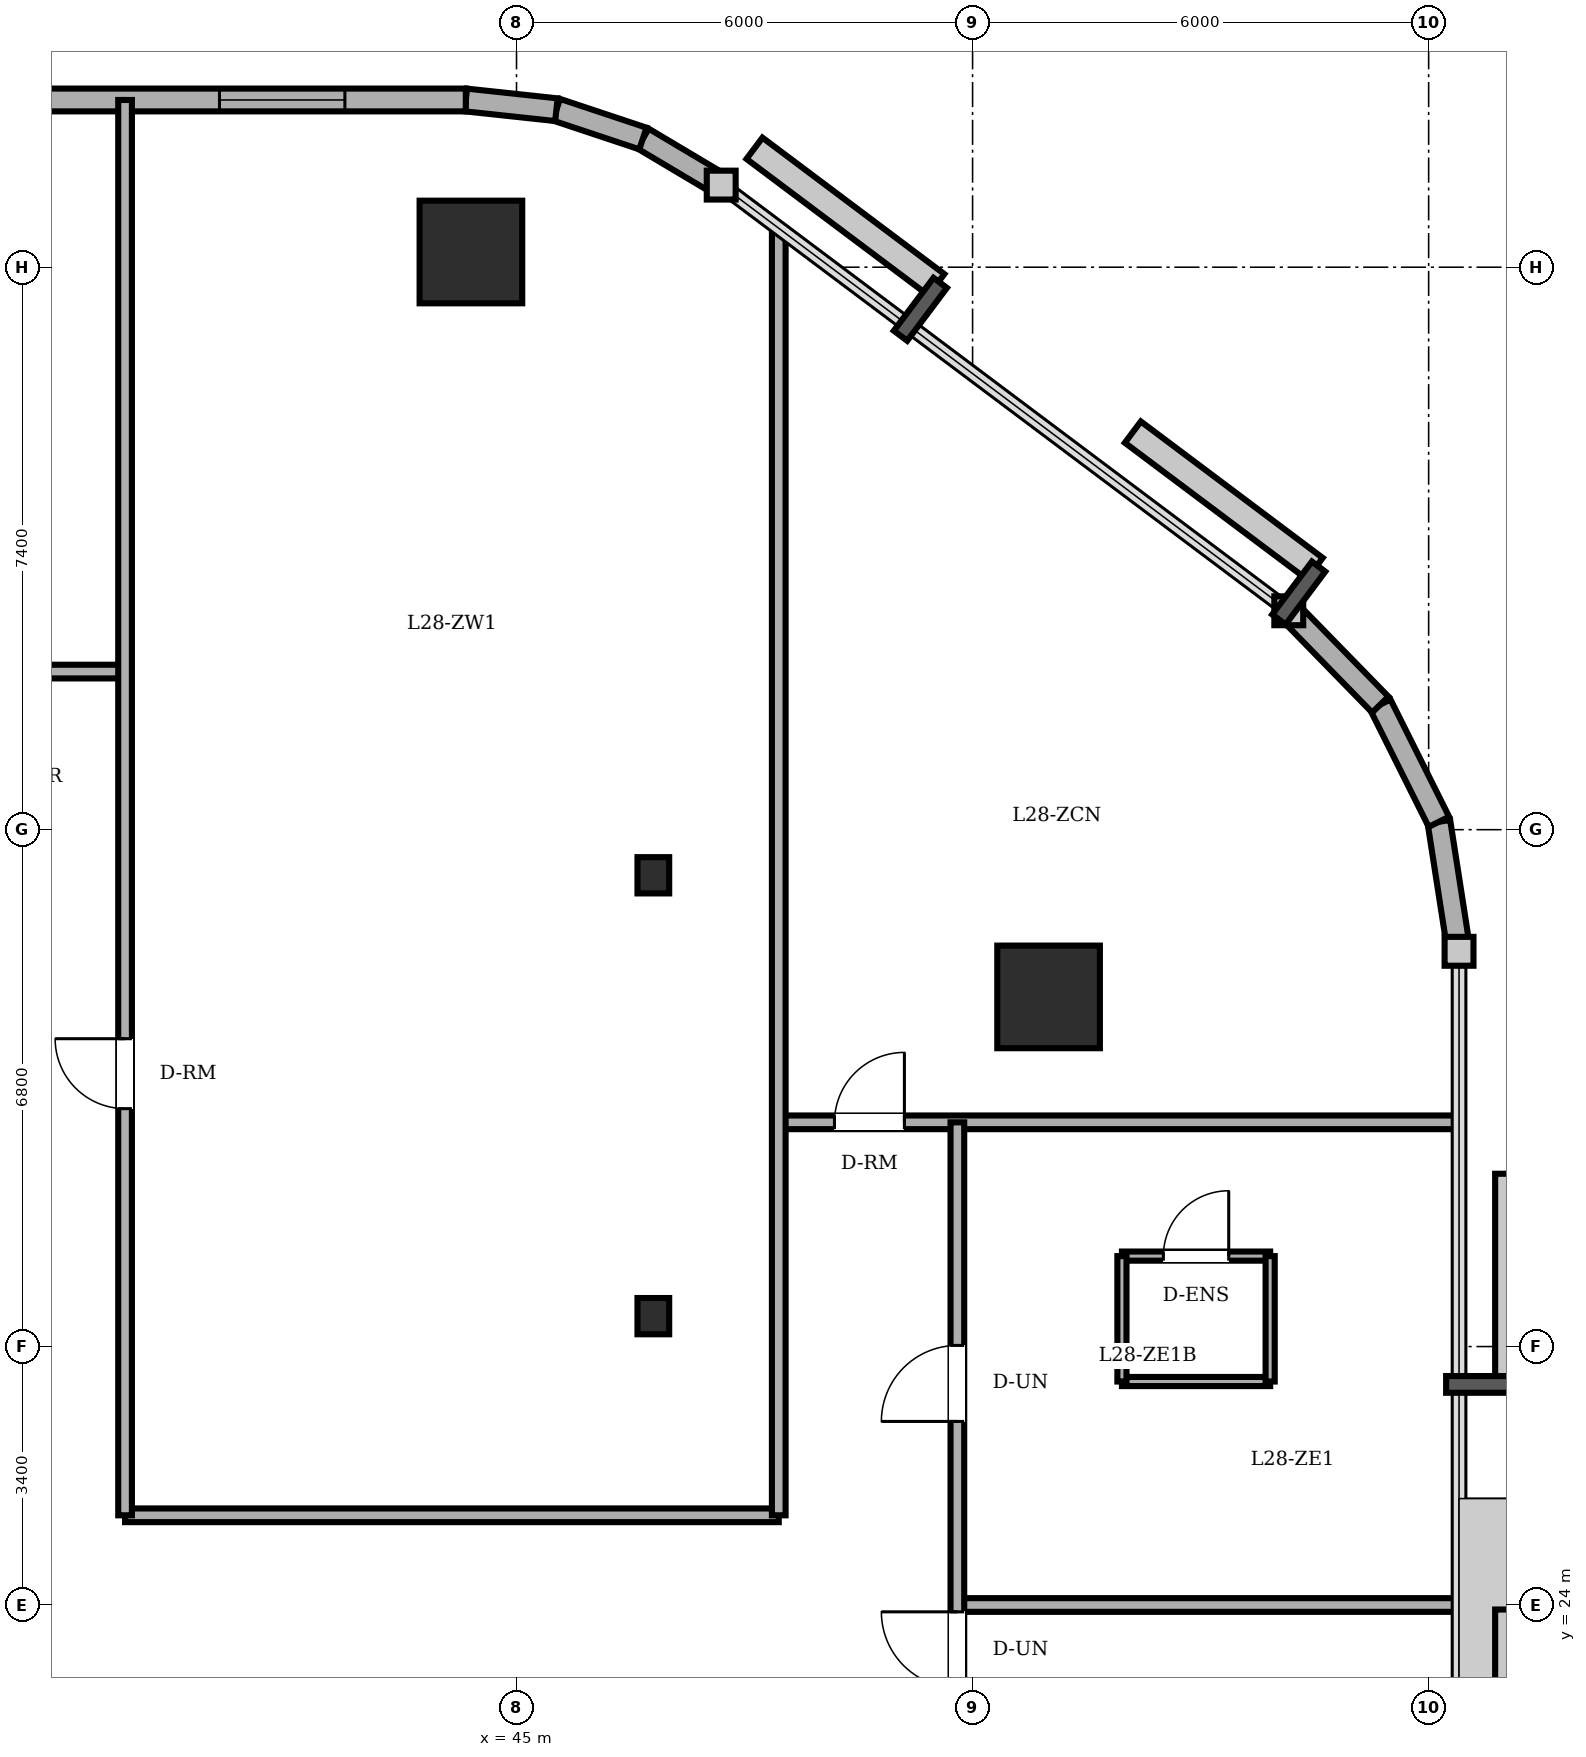
"""IFC4 building model, lengths in metres.
Left out: names, types, materials, properties, quantities, classifications, styles, units other than length and angle.
Written with IfcOpenShell. Run it as: python <this file> out.ifc"""

import sys

from ifc_helpers import new_model, si_unit, direction, frame, frame_2d, origin, origin_2d, place, context, subcontext, project, spatial, rectangle, circle, i_section, extrude, element, fill, save


model = new_model("IFC4")
c1 = context("Model", 3, precision=1e-05, world=origin(), true_north=direction((0.0, 1.0)))
c2 = subcontext(c1, "Body", "Model", "MODEL_VIEW")
j1 = project(units=[si_unit("LENGTHUNIT", "METRE"), si_unit("PLANEANGLEUNIT", "RADIAN")], contexts=[c1])
p1 = place(None, origin())
s1 = spatial("IfcSite", under=j1, at=p1, CompositionType="ELEMENT")
p2 = place(p1, origin())
s2 = spatial("IfcBuilding", under=s1, at=p2, CompositionType="ELEMENT")
p3 = place(p2, frame((0.0, 0.0, 107.9)))
s3 = spatial("IfcBuildingStorey", under=s2, at=p3, CompositionType="ELEMENT", Elevation=107.9)
for number, where, z_axis, x_axis in (
    (1, (52.0, 32.0, 0.0), (0.0, 0.0, 1.0), (1.0, 0.0, 0.0)),
    (2, (44.4, 41.8, 0.0), (0.0, 0.0, 1.0), (1.0, 0.0, 0.0)),
):
    element("IfcColumn", number, at=place(p3, frame(where, z_axis=z_axis, x_axis=x_axis)), inside=s3, PredefinedType="COLUMN", context=c2, shape_type="SweptSolid", body=[
        extrude(circle(Radius=0.675, at=origin_2d()), origin(), (0.0, 0.0, 1.0), 3.6),
    ])
for number, where, z_axis, x_axis in (
    (3, (46.8, 27.8, 0.0), (0.0, 0.0, 1.0), (1.0, 0.0, 0.0)),
    (4, (46.8, 33.6, 0.0), (0.0, 0.0, 1.0), (1.0, 0.0, 0.0)),
):
    element("IfcColumn", number, at=place(p3, frame(where, z_axis=z_axis, x_axis=x_axis)), inside=s3, PredefinedType="COLUMN", context=c2, shape_type="SweptSolid", body=[
        extrude(i_section(OverallWidth=0.417, OverallDepth=0.477, WebThickness=0.036, FlangeThickness=0.057, FilletRadius=0.015, at=origin_2d()), origin(), (0.0, 0.0, 1.0), 3.6),
    ])
p4 = place(p3, frame((57.4, 32.6, 0.0), z_axis=(0.0, 0.0, 1.0), x_axis=(-0.153620989032, 0.988129845581, 0.0)))
e5 = element("IfcWall", 5, at=p4, inside=s3, PredefinedType="SOLIDWALL", context=c2, shape_type="SweptSolid", body=[
    extrude(rectangle(XDim=1.724, YDim=0.3, at=frame_2d((0.862, 0.0))), origin(), (0.0, 0.0, 1.0), 3.4),
])
for number, where, z_axis, x_axis in (
    (6, (57.135, 34.304, 0.0), (0.0, 0.0, 1.0), (-0.447, 0.894, 0.0)),
    (7, (56.364, 35.846, 0.0), (0.0, 0.0, 1.0), (-0.698, 0.716, 0.0)),
):
    element("IfcWall", number, at=place(p3, frame(where, z_axis=z_axis, x_axis=x_axis)), inside=s3, PredefinedType="SOLIDWALL", context=c2, shape_type="SweptSolid", body=[
        extrude(rectangle(XDim=1.724, YDim=0.3, at=frame_2d((0.862, 0.0))), origin(), (0.0, 0.0, 1.0), 3.4),
    ])
p5 = place(p3, frame((47.693, 42.68, 0.0), z_axis=(0.0, 0.0, 1.0), x_axis=(-0.859320591642, 0.511437308749, 0.0)))
e8 = element("IfcWall", 8, at=p5, inside=s3, PredefinedType="SOLIDWALL", context=c2, shape_type="SweptSolid", body=[
    extrude(rectangle(XDim=1.199, YDim=0.3, at=frame_2d((0.599, 0.0))), origin(), (0.0, 0.0, 1.0), 3.4),
])
p6 = place(p3, frame((46.663, 43.293, 0.0), z_axis=(0.0, 0.0, 1.0), x_axis=(-0.948744332129, 0.316044604847, 0.0)))
e9 = element("IfcWall", 9, at=p6, inside=s3, PredefinedType="SOLIDWALL", context=c2, shape_type="SweptSolid", body=[
    extrude(rectangle(XDim=1.2, YDim=0.3, at=frame_2d((0.6, 0.0))), origin(), (0.0, 0.0, 1.0), 3.4),
])
p7 = place(p3, frame((45.525, 43.672, 0.0), z_axis=(0.0, 0.0, 1.0), x_axis=(-0.994289103787, 0.106720092254, 0.0)))
e10 = element("IfcWall", 10, at=p7, inside=s3, PredefinedType="SOLIDWALL", context=c2, shape_type="SweptSolid", body=[
    extrude(rectangle(XDim=1.199, YDim=0.3, at=frame_2d((0.599, 0.0))), origin(), (0.0, 0.0, 1.0), 3.4),
])
p8 = place(p3, frame((44.333, 43.8, 0.0), z_axis=(0.0, 0.0, 1.0), x_axis=(-1.0, 0.0, 0.0)))
e11 = element("IfcWall", 11, at=p8, inside=s3, PredefinedType="SOLIDWALL", context=c2, shape_type="SweptSolid", body=[
    extrude(rectangle(XDim=29.933, YDim=0.3, at=frame_2d((14.967, 0.0))), origin(), (0.0, 0.0, 1.0), 3.4),
])
p9 = place(p8, frame((19.808, 0.0, 0.0)))
e12 = element("IfcOpeningElement", 12, at=p9, cuts=e11, PredefinedType="OPENING", context=c2, shape_type="SweptSolid", body=[
    extrude(rectangle(XDim=0.95, YDim=2.2, at=frame_2d((0.475, 1.1))), frame((0.0, 0.16, 0.0), z_axis=(0.0, -1.0, 0.0), x_axis=(1.0, 0.0, 0.0)), (0.0, 0.0, 1.0), 0.32),
])
p10 = place(p8, frame((1.591, 0.0, 0.85)))
e13 = element("IfcOpeningElement", 13, at=p10, cuts=e11, PredefinedType="OPENING", context=c2, shape_type="SweptSolid", body=[
    extrude(rectangle(XDim=1.65, YDim=1.55, at=frame_2d((0.825, 0.775))), frame((0.0, 0.16, 0.0), z_axis=(0.0, -1.0, 0.0), x_axis=(1.0, 0.0, 0.0)), (0.0, 0.0, 1.0), 0.32),
])
p11 = place(p8, frame((6.808, 0.0, 0.85)))
e14 = element("IfcOpeningElement", 14, at=p11, cuts=e11, PredefinedType="OPENING", context=c2, shape_type="SweptSolid", body=[
    extrude(rectangle(XDim=1.65, YDim=1.55, at=frame_2d((0.825, 0.775))), frame((0.0, 0.16, 0.0), z_axis=(0.0, -1.0, 0.0), x_axis=(1.0, 0.0, 0.0)), (0.0, 0.0, 1.0), 0.32),
])
p12 = place(p8, frame((9.958, 0.0, 0.85)))
e15 = element("IfcOpeningElement", 15, at=p12, cuts=e11, PredefinedType="OPENING", context=c2, shape_type="SweptSolid", body=[
    extrude(rectangle(XDim=1.65, YDim=1.55, at=frame_2d((0.825, 0.775))), frame((0.0, 0.16, 0.0), z_axis=(0.0, -1.0, 0.0), x_axis=(1.0, 0.0, 0.0)), (0.0, 0.0, 1.0), 0.32),
])
p13 = place(p8, frame((15.508, 0.0, 0.85)))
e16 = element("IfcOpeningElement", 16, at=p13, cuts=e11, PredefinedType="OPENING", context=c2, shape_type="SweptSolid", body=[
    extrude(rectangle(XDim=1.65, YDim=1.55, at=frame_2d((0.825, 0.775))), frame((0.0, 0.16, 0.0), z_axis=(0.0, -1.0, 0.0), x_axis=(1.0, 0.0, 0.0)), (0.0, 0.0, 1.0), 0.32),
])
p14 = place(p8, frame((23.125, 0.0, 0.85)))
e17 = element("IfcOpeningElement", 17, at=p14, cuts=e11, PredefinedType="OPENING", context=c2, shape_type="SweptSolid", body=[
    extrude(rectangle(XDim=1.65, YDim=1.55, at=frame_2d((0.825, 0.775))), frame((0.0, 0.16, 0.0), z_axis=(0.0, -1.0, 0.0), x_axis=(1.0, 0.0, 0.0)), (0.0, 0.0, 1.0), 0.32),
])
p15 = place(p8, frame((25.941, 0.0, 0.85)))
e18 = element("IfcOpeningElement", 18, at=p15, cuts=e11, PredefinedType="OPENING", context=c2, shape_type="SweptSolid", body=[
    extrude(rectangle(XDim=1.65, YDim=1.55, at=frame_2d((0.825, 0.775))), frame((0.0, 0.16, 0.0), z_axis=(0.0, -1.0, 0.0), x_axis=(1.0, 0.0, 0.0)), (0.0, 0.0, 1.0), 0.32),
])
p16 = place(p3, frame((52.965, 28.59, 0.0), z_axis=(0.0, 0.0, 1.0), x_axis=(1.0, 0.0, 0.0)))
e19 = element("IfcWall", 19, at=p16, inside=s3, PredefinedType="PARTITIONING", context=c2, shape_type="SweptSolid", body=[
    extrude(rectangle(XDim=1.95, YDim=0.12, at=frame_2d((0.975, 0.0))), origin(), (0.0, 0.0, 1.0), 3.4),
])
p17 = place(p16, frame((0.545, 0.0, 0.0)))
e20 = element("IfcOpeningElement", 20, at=p17, cuts=e19, PredefinedType="OPENING", context=c2, shape_type="SweptSolid", body=[
    extrude(rectangle(XDim=0.86, YDim=2.1, at=frame_2d((0.43, 1.05))), frame((0.0, 0.07, 0.0), z_axis=(0.0, -1.0, 0.0), x_axis=(1.0, 0.0, 0.0)), (0.0, 0.0, 1.0), 0.14),
])
p18 = place(p3, frame((54.915, 26.94, 0.0), z_axis=(0.0, 0.0, 1.0), x_axis=(-1.0, 0.0, 0.0)))
e21 = element("IfcWall", 21, at=p18, inside=s3, PredefinedType="PARTITIONING", context=c2, shape_type="SweptSolid", body=[
    extrude(rectangle(XDim=1.95, YDim=0.12, at=frame_2d((0.975, 0.0))), origin(), (0.0, 0.0, 1.0), 3.4),
])
for number, where, z_axis, x_axis in (
    (22, (52.965, 28.59, 0.0), (0.0, 0.0, 1.0), (0.0, -1.0, 0.0)),
    (23, (54.915, 26.94, 0.0), (0.0, 0.0, 1.0), (0.0, 1.0, 0.0)),
):
    element("IfcWall", number, at=place(p3, frame(where, z_axis=z_axis, x_axis=x_axis)), inside=s3, PredefinedType="PARTITIONING", context=c2, shape_type="SweptSolid", body=[
        extrude(rectangle(XDim=1.65, YDim=0.12, at=frame_2d((0.825, 0.0))), origin(), (0.0, 0.0, 1.0), 3.4),
    ])
p19 = place(p3, frame((50.8, 24.0, 0.0), z_axis=(0.0, 0.0, 1.0), x_axis=(1.0, 0.0, 0.0)))
e24 = element("IfcWall", 24, at=p19, inside=s3, PredefinedType="PARTITIONING", context=c2, shape_type="SweptSolid", body=[
    extrude(rectangle(XDim=6.6, YDim=0.18, at=frame_2d((3.3, 0.0))), origin(), (0.0, 0.0, 1.0), 3.022),
])
p20 = place(p3, frame((39.85, 25.18, 0.0), z_axis=(0.0, 0.0, 1.0), x_axis=(1.0, 0.0, 0.0)))
e25 = element("IfcWall", 25, at=p20, inside=s3, PredefinedType="PARTITIONING", context=c2, shape_type="SweptSolid", body=[
    extrude(rectangle(XDim=8.6, YDim=0.18, at=frame_2d((4.3, 0.0))), origin(), (0.0, 0.0, 1.0), 3.4),
])
p21 = place(p3, frame((48.45, 30.35, 0.0), z_axis=(0.0, 0.0, 1.0), x_axis=(1.0, 0.0, 0.0)))
e26 = element("IfcWall", 26, at=p21, inside=s3, PredefinedType="PARTITIONING", context=c2, shape_type="SweptSolid", body=[
    extrude(rectangle(XDim=8.95, YDim=0.18, at=frame_2d((4.475, 0.0))), origin(), (0.0, 0.0, 1.0), 3.4),
])
p22 = place(p21, frame((0.733, 0.0, 0.0)))
e27 = element("IfcOpeningElement", 27, at=p22, cuts=e26, PredefinedType="OPENING", context=c2, shape_type="SweptSolid", body=[
    extrude(rectangle(XDim=0.92, YDim=2.1, at=frame_2d((0.46, 1.05))), frame((0.0, 0.1, 0.0), z_axis=(0.0, -1.0, 0.0), x_axis=(1.0, 0.0, 0.0)), (0.0, 0.0, 1.0), 0.2),
])
p23 = place(p3, frame((8.8, 36.28, 0.0), z_axis=(0.0, 0.0, 1.0), x_axis=(1.0, 0.0, 0.0)))
e28 = element("IfcWall", 28, at=p23, inside=s3, PredefinedType="PARTITIONING", context=c2, shape_type="SweptSolid", body=[
    extrude(rectangle(XDim=31.05, YDim=0.18, at=frame_2d((15.525, 0.0))), origin(), (0.0, 0.0, 1.0), 3.4),
])
p24 = place(p23, frame((15.65, 0.0, 0.0)))
e29 = element("IfcOpeningElement", 29, at=p24, cuts=e28, PredefinedType="OPENING", context=c2, shape_type="SweptSolid", body=[
    extrude(rectangle(XDim=0.9, YDim=2.1, at=frame_2d((0.45, 1.05))), frame((0.0, 0.1, 0.0), z_axis=(0.0, -1.0, 0.0), x_axis=(1.0, 0.0, 0.0)), (0.0, 0.0, 1.0), 0.2),
])
p25 = place(p23, frame((19.27, 0.0, 0.0)))
e30 = element("IfcOpeningElement", 30, at=p25, cuts=e28, PredefinedType="OPENING", context=c2, shape_type="SweptSolid", body=[
    extrude(rectangle(XDim=0.86, YDim=2.1, at=frame_2d((0.43, 1.05))), frame((0.0, 0.1, 0.0), z_axis=(0.0, -1.0, 0.0), x_axis=(1.0, 0.0, 0.0)), (0.0, 0.0, 1.0), 0.2),
])
p26 = place(p23, frame((7.3, 0.0, 0.0)))
e31 = element("IfcOpeningElement", 31, at=p26, cuts=e28, PredefinedType="OPENING", context=c2, shape_type="SweptSolid", body=[
    extrude(rectangle(XDim=1.0, YDim=2.15, at=frame_2d((0.5, 1.075))), frame((0.0, 0.1, 0.0), z_axis=(0.0, -1.0, 0.0), x_axis=(1.0, 0.0, 0.0)), (0.0, 0.0, 1.0), 0.2),
])
p27 = place(p23, frame((25.605, 0.0, 0.0)))
e32 = element("IfcOpeningElement", 32, at=p27, cuts=e28, PredefinedType="OPENING", context=c2, shape_type="SweptSolid", body=[
    extrude(rectangle(XDim=0.92, YDim=2.1, at=frame_2d((0.46, 1.05))), frame((0.0, 0.1, 0.0), z_axis=(0.0, -1.0, 0.0), x_axis=(1.0, 0.0, 0.0)), (0.0, 0.0, 1.0), 0.2),
])
p28 = place(p3, frame((39.85, 25.18, 0.0), z_axis=(0.0, 0.0, 1.0), x_axis=(0.0, 1.0, 0.0)))
e33 = element("IfcWall", 33, at=p28, inside=s3, PredefinedType="PARTITIONING", context=c2, shape_type="SweptSolid", body=[
    extrude(rectangle(XDim=18.62, YDim=0.18, at=frame_2d((9.31, 0.0))), origin(), (0.0, 0.0, 1.0), 3.4),
])
p29 = place(p28, frame((5.35, 0.0, 0.0)))
e34 = element("IfcOpeningElement", 34, at=p29, cuts=e33, PredefinedType="OPENING", context=c2, shape_type="SweptSolid", body=[
    extrude(rectangle(XDim=0.92, YDim=2.1, at=frame_2d((0.46, 1.05))), frame((0.0, 0.1, 0.0), z_axis=(0.0, -1.0, 0.0), x_axis=(1.0, 0.0, 0.0)), (0.0, 0.0, 1.0), 0.2),
])
p30 = place(p3, frame((48.45, 25.18, 0.0), z_axis=(0.0, 0.0, 1.0), x_axis=(0.0, 1.0, 0.0)))
e35 = element("IfcWall", 35, at=p30, inside=s3, PredefinedType="PARTITIONING", context=c2, shape_type="SweptSolid", body=[
    extrude(rectangle(XDim=16.932, YDim=0.18, at=frame_2d((8.466, 0.0))), origin(), (0.0, 0.0, 1.0), 3.4),
])
p31 = place(p3, frame((50.8, 7.65, 0.0), z_axis=(0.0, 0.0, 1.0), x_axis=(0.0, 1.0, 0.0)))
e36 = element("IfcWall", 36, at=p31, inside=s3, PredefinedType="PARTITIONING", context=c2, shape_type="SweptSolid", body=[
    extrude(rectangle(XDim=22.7, YDim=0.18, at=frame_2d((11.35, 0.0))), origin(), (0.0, 0.0, 1.0), 3.4),
])
p32 = place(p31, frame((18.765, 0.0, 0.0)))
e37 = element("IfcOpeningElement", 37, at=p32, cuts=e36, PredefinedType="OPENING", context=c2, shape_type="SweptSolid", body=[
    extrude(rectangle(XDim=1.0, YDim=2.15, at=frame_2d((0.5, 1.075))), frame((0.0, 0.1, 0.0), z_axis=(0.0, -1.0, 0.0), x_axis=(1.0, 0.0, 0.0)), (0.0, 0.0, 1.0), 0.2),
])
p33 = place(p31, frame((15.26, 0.0, 0.0)))
e38 = element("IfcOpeningElement", 38, at=p33, cuts=e36, PredefinedType="OPENING", context=c2, shape_type="SweptSolid", body=[
    extrude(rectangle(XDim=1.0, YDim=2.15, at=frame_2d((0.5, 1.075))), frame((0.0, 0.1, 0.0), z_axis=(0.0, -1.0, 0.0), x_axis=(1.0, 0.0, 0.0)), (0.0, 0.0, 1.0), 0.2),
])
p34 = place(p10, origin())
e39 = element("IfcWindow", 39, at=p34, inside=s3, PartitioningType="DOUBLE_PANEL_VERTICAL", PredefinedType="WINDOW", context=c2, shape_type="SweptSolid", body=[
    extrude(rectangle(XDim=1.65, YDim=1.55, at=frame_2d((0.825, 0.775))), frame((0.0, 0.03, 0.0), z_axis=(0.0, -1.0, 0.0), x_axis=(1.0, 0.0, 0.0)), (0.0, 0.0, 1.0), 0.06),
])
fill(e13, e39)
p35 = place(p17, origin())
e40 = element("IfcDoor", 40, at=p35, inside=s3, OperationType="SINGLE_SWING_RIGHT", PredefinedType="DOOR", context=c2, shape_type="SweptSolid", body=[
    extrude(rectangle(XDim=0.86, YDim=2.1, at=frame_2d((0.43, 1.05))), frame((0.0, 0.025, 0.0), z_axis=(0.0, -1.0, 0.0), x_axis=(1.0, 0.0, 0.0)), (0.0, 0.0, 1.0), 0.05),
])
fill(e20, e40)
p36 = place(p29, origin())
e41 = element("IfcDoor", 41, at=p36, inside=s3, OperationType="SINGLE_SWING_RIGHT", PredefinedType="DOOR", context=c2, shape_type="SweptSolid", body=[
    extrude(rectangle(XDim=0.92, YDim=2.1, at=frame_2d((0.46, 1.05))), frame((0.0, 0.025, 0.0), z_axis=(0.0, -1.0, 0.0), x_axis=(1.0, 0.0, 0.0)), (0.0, 0.0, 1.0), 0.05),
])
fill(e34, e41)
p37 = place(p22, origin())
e42 = element("IfcDoor", 42, at=p37, inside=s3, OperationType="SINGLE_SWING_RIGHT", PredefinedType="DOOR", context=c2, shape_type="SweptSolid", body=[
    extrude(rectangle(XDim=0.92, YDim=2.1, at=frame_2d((0.46, 1.05))), frame((0.0, 0.025, 0.0), z_axis=(0.0, -1.0, 0.0), x_axis=(1.0, 0.0, 0.0)), (0.0, 0.0, 1.0), 0.05),
])
fill(e27, e42)
p38 = place(p32, origin())
e43 = element("IfcDoor", 43, at=p38, inside=s3, OperationType="SINGLE_SWING_LEFT", PredefinedType="DOOR", context=c2, shape_type="SweptSolid", body=[
    extrude(rectangle(XDim=1.0, YDim=2.15, at=frame_2d((0.5, 1.075))), frame((0.0, 0.025, 0.0), z_axis=(0.0, -1.0, 0.0), x_axis=(1.0, 0.0, 0.0)), (0.0, 0.0, 1.0), 0.05),
])
fill(e37, e43)
p39 = place(p33, origin())
e44 = element("IfcDoor", 44, at=p39, inside=s3, OperationType="SINGLE_SWING_RIGHT", PredefinedType="DOOR", context=c2, shape_type="SweptSolid", body=[
    extrude(rectangle(XDim=1.0, YDim=2.15, at=frame_2d((0.5, 1.075))), frame((0.0, 0.025, 0.0), z_axis=(0.0, -1.0, 0.0), x_axis=(1.0, 0.0, 0.0)), (0.0, 0.0, 1.0), 0.05),
])
fill(e38, e44)
save(model, sys.argv[1])
